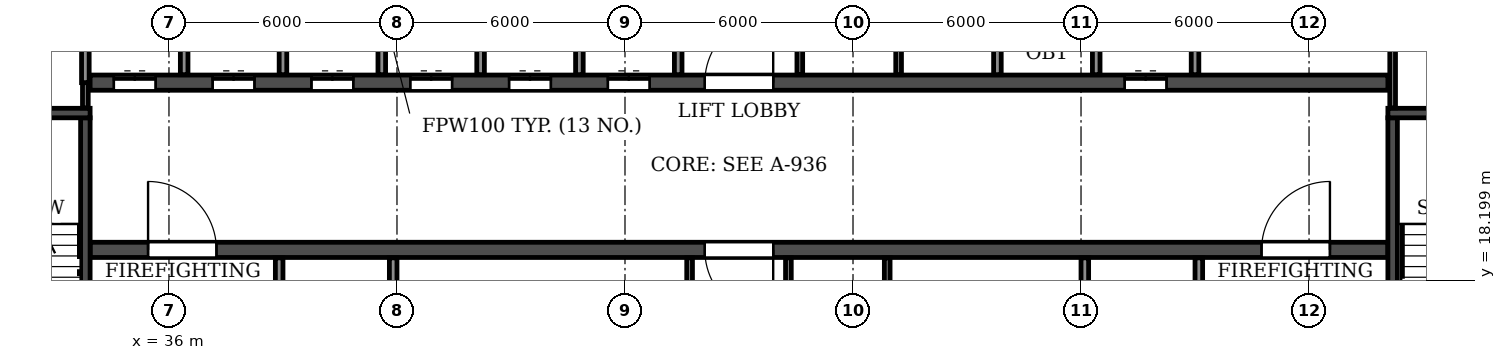
"""IFC4 building model, lengths in metres.
Left out: names, types, materials, properties, quantities, classifications, styles, units other than length and angle.
Written with IfcOpenShell. Run it as: python <this file> out.ifc"""

import sys

from ifc_helpers import new_model, si_unit, direction, frame, frame_2d, origin, place, context, subcontext, project, spatial, rectangle, extrude, element, fill, save


model = new_model("IFC4")
c1 = context("Model", 3, precision=1e-05, world=origin(), true_north=direction((0.0, 1.0)))
c2 = subcontext(c1, "Body", "Model", "MODEL_VIEW")
j1 = project(units=[si_unit("LENGTHUNIT", "METRE"), si_unit("PLANEANGLEUNIT", "RADIAN")], contexts=[c1])
p1 = place(None, origin())
s1 = spatial("IfcSite", under=j1, at=p1, CompositionType="ELEMENT")
p2 = place(p1, origin())
s2 = spatial("IfcBuilding", under=s1, at=p2, CompositionType="ELEMENT")
p3 = place(p2, frame((0.0, 0.0, 208.2)))
s3 = spatial("IfcBuildingStorey", under=s2, at=p3, CompositionType="ELEMENT", Elevation=208.2)
p4 = place(p3, frame((33.925, 19.0, 0.0), z_axis=(0.0, 0.0, 1.0), x_axis=(1.0, 0.0, 0.0)))
e1 = element("IfcWall", 1, at=p4, inside=s3, PredefinedType="SOLIDWALL", context=c2, shape_type="SweptSolid", body=[
    extrude(rectangle(XDim=34.15, YDim=0.4, at=frame_2d((17.075, 0.0))), origin(), (0.0, 0.0, 1.0), 3.0),
])
p5 = place(p4, frame((16.175, 0.0, 0.0)))
e2 = element("IfcOpeningElement", 2, at=p5, cuts=e1, PredefinedType="OPENING", context=c2, shape_type="SweptSolid", body=[
    extrude(rectangle(XDim=1.8, YDim=2.1, at=frame_2d((0.9, 1.05))), frame((0.0, 0.21, 0.0), z_axis=(0.0, -1.0, 0.0), x_axis=(1.0, 0.0, 0.0)), (0.0, 0.0, 1.0), 0.42),
])
p6 = place(p4, frame((1.525, 0.0, 0.0)))
e3 = element("IfcOpeningElement", 3, at=p6, cuts=e1, PredefinedType="OPENING", context=c2, shape_type="SweptSolid", body=[
    extrude(rectangle(XDim=1.8, YDim=2.1, at=frame_2d((0.9, 1.05))), frame((0.0, 0.21, 0.0), z_axis=(0.0, -1.0, 0.0), x_axis=(1.0, 0.0, 0.0)), (0.0, 0.0, 1.0), 0.42),
])
p7 = place(p4, frame((30.825, 0.0, 0.0)))
e4 = element("IfcOpeningElement", 4, at=p7, cuts=e1, PredefinedType="OPENING", context=c2, shape_type="SweptSolid", body=[
    extrude(rectangle(XDim=1.8, YDim=2.1, at=frame_2d((0.9, 1.05))), frame((0.0, 0.21, 0.0), z_axis=(0.0, -1.0, 0.0), x_axis=(1.0, 0.0, 0.0)), (0.0, 0.0, 1.0), 0.42),
])
p8 = place(p3, frame((33.925, 23.4, 0.0), z_axis=(0.0, 0.0, 1.0), x_axis=(1.0, 0.0, 0.0)))
e5 = element("IfcWall", 5, at=p8, inside=s3, PredefinedType="SOLIDWALL", context=c2, shape_type="SweptSolid", body=[
    extrude(rectangle(XDim=34.15, YDim=0.4, at=frame_2d((17.075, 0.0))), origin(), (0.0, 0.0, 1.0), 3.0),
])
p9 = place(p8, frame((16.175, 0.0, 0.0)))
e6 = element("IfcOpeningElement", 6, at=p9, cuts=e5, PredefinedType="OPENING", context=c2, shape_type="SweptSolid", body=[
    extrude(rectangle(XDim=1.8, YDim=2.1, at=frame_2d((0.9, 1.05))), frame((0.0, 0.21, 0.0), z_axis=(0.0, -1.0, 0.0), x_axis=(1.0, 0.0, 0.0)), (0.0, 0.0, 1.0), 0.42),
])
p10 = place(p8, frame((0.625, 0.0, 0.0)))
e7 = element("IfcOpeningElement", 7, at=p10, cuts=e5, PredefinedType="OPENING", context=c2, shape_type="SweptSolid", body=[
    extrude(rectangle(XDim=1.1, YDim=2.1, at=frame_2d((0.55, 1.05))), frame((0.0, 0.21, 0.0), z_axis=(0.0, -1.0, 0.0), x_axis=(1.0, 0.0, 0.0)), (0.0, 0.0, 1.0), 0.42),
])
p11 = place(p8, frame((3.225, 0.0, 0.0)))
e8 = element("IfcOpeningElement", 8, at=p11, cuts=e5, PredefinedType="OPENING", context=c2, shape_type="SweptSolid", body=[
    extrude(rectangle(XDim=1.1, YDim=2.1, at=frame_2d((0.55, 1.05))), frame((0.0, 0.21, 0.0), z_axis=(0.0, -1.0, 0.0), x_axis=(1.0, 0.0, 0.0)), (0.0, 0.0, 1.0), 0.42),
])
p12 = place(p8, frame((5.825, 0.0, 0.0)))
e9 = element("IfcOpeningElement", 9, at=p12, cuts=e5, PredefinedType="OPENING", context=c2, shape_type="SweptSolid", body=[
    extrude(rectangle(XDim=1.1, YDim=2.1, at=frame_2d((0.55, 1.05))), frame((0.0, 0.21, 0.0), z_axis=(0.0, -1.0, 0.0), x_axis=(1.0, 0.0, 0.0)), (0.0, 0.0, 1.0), 0.42),
])
p13 = place(p8, frame((8.425, 0.0, 0.0)))
e10 = element("IfcOpeningElement", 10, at=p13, cuts=e5, PredefinedType="OPENING", context=c2, shape_type="SweptSolid", body=[
    extrude(rectangle(XDim=1.1, YDim=2.1, at=frame_2d((0.55, 1.05))), frame((0.0, 0.21, 0.0), z_axis=(0.0, -1.0, 0.0), x_axis=(1.0, 0.0, 0.0)), (0.0, 0.0, 1.0), 0.42),
])
p14 = place(p8, frame((11.025, 0.0, 0.0)))
e11 = element("IfcOpeningElement", 11, at=p14, cuts=e5, PredefinedType="OPENING", context=c2, shape_type="SweptSolid", body=[
    extrude(rectangle(XDim=1.1, YDim=2.1, at=frame_2d((0.55, 1.05))), frame((0.0, 0.21, 0.0), z_axis=(0.0, -1.0, 0.0), x_axis=(1.0, 0.0, 0.0)), (0.0, 0.0, 1.0), 0.42),
])
p15 = place(p8, frame((13.625, 0.0, 0.0)))
e12 = element("IfcOpeningElement", 12, at=p15, cuts=e5, PredefinedType="OPENING", context=c2, shape_type="SweptSolid", body=[
    extrude(rectangle(XDim=1.1, YDim=2.1, at=frame_2d((0.55, 1.05))), frame((0.0, 0.21, 0.0), z_axis=(0.0, -1.0, 0.0), x_axis=(1.0, 0.0, 0.0)), (0.0, 0.0, 1.0), 0.42),
])
p16 = place(p8, frame((27.225, 0.0, 0.0)))
e13 = element("IfcOpeningElement", 13, at=p16, cuts=e5, PredefinedType="OPENING", context=c2, shape_type="SweptSolid", body=[
    extrude(rectangle(XDim=1.1, YDim=2.1, at=frame_2d((0.55, 1.05))), frame((0.0, 0.21, 0.0), z_axis=(0.0, -1.0, 0.0), x_axis=(1.0, 0.0, 0.0)), (0.0, 0.0, 1.0), 0.42),
])
p17 = place(p3, frame((33.8, 14.8, 0.0), z_axis=(0.0, 0.0, 1.0), x_axis=(0.0, 1.0, 0.0)))
e14 = element("IfcWall", 14, at=p17, inside=s3, PredefinedType="SOLIDWALL", context=c2, shape_type="SweptSolid", body=[
    extrude(rectangle(XDim=7.675, YDim=0.25, at=frame_2d((3.837, 0.0))), origin(), (0.0, 0.0, 1.0), 3.0),
])
p18 = place(p17, frame((0.5, 0.0, 0.0)))
e15 = element("IfcOpeningElement", 15, at=p18, cuts=e14, PredefinedType="OPENING", context=c2, shape_type="SweptSolid", body=[
    extrude(rectangle(XDim=1.0, YDim=2.1, at=frame_2d((0.5, 1.05))), frame((0.0, 0.135, 0.0), z_axis=(0.0, -1.0, 0.0), x_axis=(1.0, 0.0, 0.0)), (0.0, 0.0, 1.0), 0.27),
])
p19 = place(p3, frame((29.875, 22.6, 0.0), z_axis=(0.0, 0.0, 1.0), x_axis=(1.0, 0.0, 0.0)))
e16 = element("IfcWall", 16, at=p19, inside=s3, PredefinedType="SOLIDWALL", context=c2, shape_type="SweptSolid", body=[
    extrude(rectangle(XDim=4.05, YDim=0.25, at=frame_2d((2.025, 0.0))), origin(), (0.0, 0.0, 1.0), 3.0),
])
p20 = place(p3, frame((68.2, 14.8, 0.0), z_axis=(0.0, 0.0, 1.0), x_axis=(0.0, 1.0, 0.0)))
e17 = element("IfcWall", 17, at=p20, inside=s3, PredefinedType="SOLIDWALL", context=c2, shape_type="SweptSolid", body=[
    extrude(rectangle(XDim=7.675, YDim=0.25, at=frame_2d((3.837, 0.0))), origin(), (0.0, 0.0, 1.0), 3.0),
])
p21 = place(p20, frame((0.5, 0.0, 0.0)))
e18 = element("IfcOpeningElement", 18, at=p21, cuts=e17, PredefinedType="OPENING", context=c2, shape_type="SweptSolid", body=[
    extrude(rectangle(XDim=1.0, YDim=2.1, at=frame_2d((0.5, 1.05))), frame((0.0, 0.135, 0.0), z_axis=(0.0, -1.0, 0.0), x_axis=(1.0, 0.0, 0.0)), (0.0, 0.0, 1.0), 0.27),
])
p22 = place(p3, frame((68.075, 22.6, 0.0), z_axis=(0.0, 0.0, 1.0), x_axis=(1.0, 0.0, 0.0)))
e19 = element("IfcWall", 19, at=p22, inside=s3, PredefinedType="SOLIDWALL", context=c2, shape_type="SweptSolid", body=[
    extrude(rectangle(XDim=4.05, YDim=0.25, at=frame_2d((2.025, 0.0))), origin(), (0.0, 0.0, 1.0), 3.0),
])
for number, where, z_axis, x_axis in (
    (20, (49.7, 14.81, 0.0), (0.0, 0.0, 1.0), (0.0, 1.0, 0.0)),
    (21, (52.3, 14.81, 0.0), (0.0, 0.0, 1.0), (0.0, 1.0, 0.0)),
    (22, (52.6, 23.61, 0.0), (0.0, 0.0, 1.0), (0.0, 1.0, 0.0)),
    (23, (54.9, 14.81, 0.0), (0.0, 0.0, 1.0), (0.0, 1.0, 0.0)),
    (24, (55.2, 23.61, 0.0), (0.0, 0.0, 1.0), (0.0, 1.0, 0.0)),
):
    element("IfcWall", number, at=place(p3, frame(where, z_axis=z_axis, x_axis=x_axis)), inside=s3, PredefinedType="PARTITIONING", context=c2, shape_type="SweptSolid", body=[
        extrude(rectangle(XDim=3.98, YDim=0.15, at=frame_2d((1.99, 0.0))), origin(), (0.0, 0.0, 1.0), 3.0),
    ])
p23 = place(p3, frame((33.8, 22.735, 0.0), z_axis=(0.0, 0.0, 1.0), x_axis=(0.0, 1.0, 0.0)))
e25 = element("IfcWall", 25, at=p23, inside=s3, PredefinedType="PARTITIONING", context=c2, shape_type="SweptSolid", body=[
    extrude(rectangle(XDim=0.665, YDim=0.15, at=frame_2d((0.333, 0.0))), origin(), (0.0, 0.0, 1.0), 3.0),
])
p24 = place(p3, frame((68.2, 22.735, 0.0), z_axis=(0.0, 0.0, 1.0), x_axis=(0.0, 1.0, 0.0)))
e26 = element("IfcWall", 26, at=p24, inside=s3, PredefinedType="PARTITIONING", context=c2, shape_type="SweptSolid", body=[
    extrude(rectangle(XDim=4.855, YDim=0.15, at=frame_2d((2.427, 0.0))), origin(), (0.0, 0.0, 1.0), 3.0),
])
p25 = place(p3, frame((33.8, 23.4, 0.0), z_axis=(0.0, 0.0, 1.0), x_axis=(0.0, 1.0, 0.0)))
e27 = element("IfcWall", 27, at=p25, inside=s3, PredefinedType="PARTITIONING", context=c2, shape_type="SweptSolid", body=[
    extrude(rectangle(XDim=2.7, YDim=0.2, at=frame_2d((1.35, 0.0))), origin(), (0.0, 0.0, 1.0), 3.0),
])
p26 = place(p3, frame((36.4, 23.61, 0.0), z_axis=(0.0, 0.0, 1.0), x_axis=(0.0, 1.0, 0.0)))
e28 = element("IfcWall", 28, at=p26, inside=s3, PredefinedType="PARTITIONING", context=c2, shape_type="SweptSolid", body=[
    extrude(rectangle(XDim=2.49, YDim=0.2, at=frame_2d((1.245, 0.0))), origin(), (0.0, 0.0, 1.0), 3.0),
])
p27 = place(p3, frame((38.9, 14.81, 0.0), z_axis=(0.0, 0.0, 1.0), x_axis=(0.0, 1.0, 0.0)))
e29 = element("IfcWall", 29, at=p27, inside=s3, PredefinedType="PARTITIONING", context=c2, shape_type="SweptSolid", body=[
    extrude(rectangle(XDim=3.98, YDim=0.2, at=frame_2d((1.99, 0.0))), origin(), (0.0, 0.0, 1.0), 3.0),
])
p28 = place(p27, frame((1.44, 0.0, 0.0)))
e30 = element("IfcOpeningElement", 30, at=p28, cuts=e29, PredefinedType="OPENING", context=c2, shape_type="SweptSolid", body=[
    extrude(rectangle(XDim=1.1, YDim=2.1, at=frame_2d((0.55, 1.05))), frame((0.0, 0.11, 0.0), z_axis=(0.0, -1.0, 0.0), x_axis=(1.0, 0.0, 0.0)), (0.0, 0.0, 1.0), 0.22),
])
for number, where, z_axis, x_axis in (
    (31, (39.0, 23.61, 0.0), (0.0, 0.0, 1.0), (0.0, 1.0, 0.0)),
    (32, (41.6, 23.61, 0.0), (0.0, 0.0, 1.0), (0.0, 1.0, 0.0)),
):
    element("IfcWall", number, at=place(p3, frame(where, z_axis=z_axis, x_axis=x_axis)), inside=s3, PredefinedType="PARTITIONING", context=c2, shape_type="SweptSolid", body=[
        extrude(rectangle(XDim=2.49, YDim=0.2, at=frame_2d((1.245, 0.0))), origin(), (0.0, 0.0, 1.0), 3.0),
    ])
for number, where, z_axis, x_axis in (
    (33, (41.9, 14.81, 0.0), (0.0, 0.0, 1.0), (0.0, 1.0, 0.0)),
    (34, (44.2, 23.61, 0.0), (0.0, 0.0, 1.0), (0.0, 1.0, 0.0)),
    (35, (46.8, 23.61, 0.0), (0.0, 0.0, 1.0), (0.0, 1.0, 0.0)),
):
    element("IfcWall", number, at=place(p3, frame(where, z_axis=z_axis, x_axis=x_axis)), inside=s3, PredefinedType="PARTITIONING", context=c2, shape_type="SweptSolid", body=[
        extrude(rectangle(XDim=3.98, YDim=0.2, at=frame_2d((1.99, 0.0))), origin(), (0.0, 0.0, 1.0), 3.0),
    ])
for number, where, z_axis, x_axis in (
    (36, (49.4, 23.61, 0.0), (0.0, 0.0, 1.0), (0.0, 1.0, 0.0)),
    (37, (57.8, 23.61, 0.0), (0.0, 0.0, 1.0), (0.0, 1.0, 0.0)),
):
    element("IfcWall", number, at=place(p3, frame(where, z_axis=z_axis, x_axis=x_axis)), inside=s3, PredefinedType="PARTITIONING", context=c2, shape_type="SweptSolid", body=[
        extrude(rectangle(XDim=2.49, YDim=0.2, at=frame_2d((1.245, 0.0))), origin(), (0.0, 0.0, 1.0), 3.0),
    ])
p29 = place(p3, frame((60.1, 14.81, 0.0), z_axis=(0.0, 0.0, 1.0), x_axis=(0.0, 1.0, 0.0)))
e38 = element("IfcWall", 38, at=p29, inside=s3, PredefinedType="PARTITIONING", context=c2, shape_type="SweptSolid", body=[
    extrude(rectangle(XDim=3.98, YDim=0.2, at=frame_2d((1.99, 0.0))), origin(), (0.0, 0.0, 1.0), 3.0),
])
for number, where, z_axis, x_axis in (
    (39, (60.4, 23.61, 0.0), (0.0, 0.0, 1.0), (0.0, 1.0, 0.0)),
    (40, (63.0, 23.61, 0.0), (0.0, 0.0, 1.0), (0.0, 1.0, 0.0)),
):
    element("IfcWall", number, at=place(p3, frame(where, z_axis=z_axis, x_axis=x_axis)), inside=s3, PredefinedType="PARTITIONING", context=c2, shape_type="SweptSolid", body=[
        extrude(rectangle(XDim=2.49, YDim=0.2, at=frame_2d((1.245, 0.0))), origin(), (0.0, 0.0, 1.0), 3.0),
    ])
p30 = place(p3, frame((63.1, 14.81, 0.0), z_axis=(0.0, 0.0, 1.0), x_axis=(0.0, 1.0, 0.0)))
e41 = element("IfcWall", 41, at=p30, inside=s3, PredefinedType="PARTITIONING", context=c2, shape_type="SweptSolid", body=[
    extrude(rectangle(XDim=3.98, YDim=0.2, at=frame_2d((1.99, 0.0))), origin(), (0.0, 0.0, 1.0), 3.0),
])
p31 = place(p30, frame((1.44, 0.0, 0.0)))
e42 = element("IfcOpeningElement", 42, at=p31, cuts=e41, PredefinedType="OPENING", context=c2, shape_type="SweptSolid", body=[
    extrude(rectangle(XDim=1.1, YDim=2.1, at=frame_2d((0.55, 1.05))), frame((0.0, 0.11, 0.0), z_axis=(0.0, -1.0, 0.0), x_axis=(1.0, 0.0, 0.0)), (0.0, 0.0, 1.0), 0.22),
])
p32 = place(p9, origin())
e43 = element("IfcDoor", 43, at=p32, inside=s3, OperationType="DOUBLE_DOOR_SINGLE_SWING", PredefinedType="DOOR", context=c2, shape_type="SweptSolid", body=[
    extrude(rectangle(XDim=1.8, YDim=2.1, at=frame_2d((0.9, 1.05))), frame((0.0, 0.025, 0.0), z_axis=(0.0, -1.0, 0.0), x_axis=(1.0, 0.0, 0.0)), (0.0, 0.0, 1.0), 0.05),
])
fill(e6, e43)
p33 = place(p5, frame((1.8, 0.0, 0.0), z_axis=(0.0, 0.0, 1.0), x_axis=(-1.0, 0.0, 0.0)))
e44 = element("IfcDoor", 44, at=p33, inside=s3, OperationType="DOUBLE_DOOR_SINGLE_SWING", PredefinedType="DOOR", context=c2, shape_type="SweptSolid", body=[
    extrude(rectangle(XDim=1.8, YDim=2.1, at=frame_2d((0.9, 1.05))), frame((0.0, 0.025, 0.0), z_axis=(0.0, -1.0, 0.0), x_axis=(1.0, 0.0, 0.0)), (0.0, 0.0, 1.0), 0.05),
])
fill(e2, e44)
p34 = place(p10, origin())
e45 = element("IfcDoor", 45, at=p34, inside=s3, OperationType="DOUBLE_DOOR_SLIDING", PredefinedType="DOOR", context=c2, shape_type="SweptSolid", body=[
    extrude(rectangle(XDim=1.1, YDim=2.1, at=frame_2d((0.55, 1.05))), frame((0.0, 0.025, 0.0), z_axis=(0.0, -1.0, 0.0), x_axis=(1.0, 0.0, 0.0)), (0.0, 0.0, 1.0), 0.05),
])
fill(e7, e45)
p35 = place(p6, origin())
e46 = element("IfcDoor", 46, at=p35, inside=s3, OperationType="DOUBLE_DOOR_SINGLE_SWING", PredefinedType="DOOR", context=c2, shape_type="SweptSolid", body=[
    extrude(rectangle(XDim=1.8, YDim=2.1, at=frame_2d((0.9, 1.05))), frame((0.0, 0.025, 0.0), z_axis=(0.0, -1.0, 0.0), x_axis=(1.0, 0.0, 0.0)), (0.0, 0.0, 1.0), 0.05),
])
fill(e3, e46)
p36 = place(p11, origin())
e47 = element("IfcDoor", 47, at=p36, inside=s3, OperationType="DOUBLE_DOOR_SLIDING", PredefinedType="DOOR", context=c2, shape_type="SweptSolid", body=[
    extrude(rectangle(XDim=1.1, YDim=2.1, at=frame_2d((0.55, 1.05))), frame((0.0, 0.025, 0.0), z_axis=(0.0, -1.0, 0.0), x_axis=(1.0, 0.0, 0.0)), (0.0, 0.0, 1.0), 0.05),
])
fill(e8, e47)
p37 = place(p12, origin())
e48 = element("IfcDoor", 48, at=p37, inside=s3, OperationType="DOUBLE_DOOR_SLIDING", PredefinedType="DOOR", context=c2, shape_type="SweptSolid", body=[
    extrude(rectangle(XDim=1.1, YDim=2.1, at=frame_2d((0.55, 1.05))), frame((0.0, 0.025, 0.0), z_axis=(0.0, -1.0, 0.0), x_axis=(1.0, 0.0, 0.0)), (0.0, 0.0, 1.0), 0.05),
])
fill(e9, e48)
p38 = place(p13, origin())
e49 = element("IfcDoor", 49, at=p38, inside=s3, OperationType="DOUBLE_DOOR_SLIDING", PredefinedType="DOOR", context=c2, shape_type="SweptSolid", body=[
    extrude(rectangle(XDim=1.1, YDim=2.1, at=frame_2d((0.55, 1.05))), frame((0.0, 0.025, 0.0), z_axis=(0.0, -1.0, 0.0), x_axis=(1.0, 0.0, 0.0)), (0.0, 0.0, 1.0), 0.05),
])
fill(e10, e49)
p39 = place(p14, origin())
e50 = element("IfcDoor", 50, at=p39, inside=s3, OperationType="DOUBLE_DOOR_SLIDING", PredefinedType="DOOR", context=c2, shape_type="SweptSolid", body=[
    extrude(rectangle(XDim=1.1, YDim=2.1, at=frame_2d((0.55, 1.05))), frame((0.0, 0.025, 0.0), z_axis=(0.0, -1.0, 0.0), x_axis=(1.0, 0.0, 0.0)), (0.0, 0.0, 1.0), 0.05),
])
fill(e11, e50)
p40 = place(p15, origin())
e51 = element("IfcDoor", 51, at=p40, inside=s3, OperationType="DOUBLE_DOOR_SLIDING", PredefinedType="DOOR", context=c2, shape_type="SweptSolid", body=[
    extrude(rectangle(XDim=1.1, YDim=2.1, at=frame_2d((0.55, 1.05))), frame((0.0, 0.025, 0.0), z_axis=(0.0, -1.0, 0.0), x_axis=(1.0, 0.0, 0.0)), (0.0, 0.0, 1.0), 0.05),
])
fill(e12, e51)
p41 = place(p16, origin())
e52 = element("IfcDoor", 52, at=p41, inside=s3, OperationType="DOUBLE_DOOR_SLIDING", PredefinedType="DOOR", context=c2, shape_type="SweptSolid", body=[
    extrude(rectangle(XDim=1.1, YDim=2.1, at=frame_2d((0.55, 1.05))), frame((0.0, 0.025, 0.0), z_axis=(0.0, -1.0, 0.0), x_axis=(1.0, 0.0, 0.0)), (0.0, 0.0, 1.0), 0.05),
])
fill(e13, e52)
p42 = place(p7, origin())
e53 = element("IfcDoor", 53, at=p42, inside=s3, OperationType="DOUBLE_DOOR_SINGLE_SWING", PredefinedType="DOOR", context=c2, shape_type="SweptSolid", body=[
    extrude(rectangle(XDim=1.8, YDim=2.1, at=frame_2d((0.9, 1.05))), frame((0.0, 0.025, 0.0), z_axis=(0.0, -1.0, 0.0), x_axis=(1.0, 0.0, 0.0)), (0.0, 0.0, 1.0), 0.05),
])
fill(e4, e53)
save(model, sys.argv[1])
